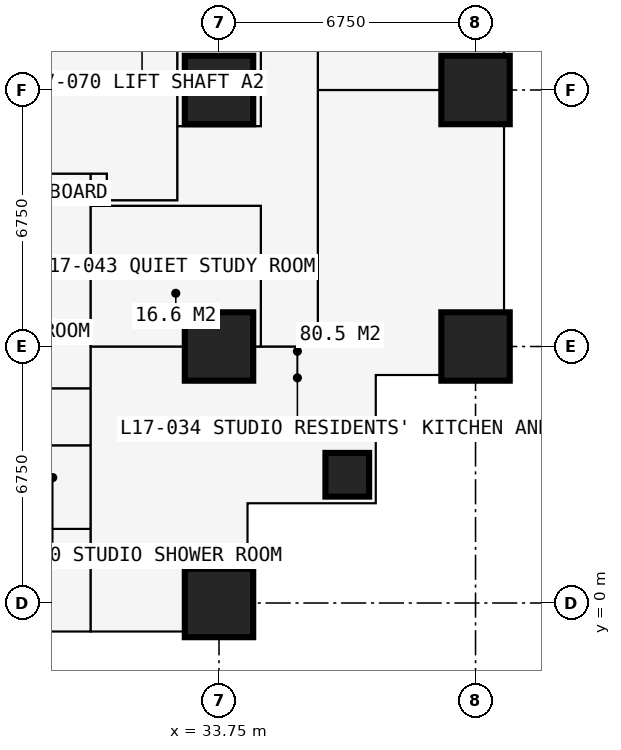
"""IFC4 building model, lengths in metres.
Left out: names, types, materials, properties, quantities, classifications, styles, units other than length and angle.
Written with IfcOpenShell. Run it as: python <this file> out.ifc"""

import sys

from ifc_helpers import new_model, si_unit, direction, frame, frame_2d, origin, origin_2d, place, context, subcontext, project, spatial, rectangle, extrude, element, fill, save


model = new_model("IFC4")
c1 = context("Model", 3, precision=1e-05, world=origin(), true_north=direction((0.0, 1.0)))
c2 = subcontext(c1, "Body", "Model", "MODEL_VIEW")
j1 = project(units=[si_unit("LENGTHUNIT", "METRE"), si_unit("PLANEANGLEUNIT", "RADIAN")], contexts=[c1])
p1 = place(None, origin())
s1 = spatial("IfcSite", under=j1, at=p1, CompositionType="ELEMENT")
p2 = place(p1, origin())
s2 = spatial("IfcBuilding", under=s1, at=p2, CompositionType="ELEMENT")
p3 = place(p2, frame((0.0, 0.0, 64.8)))
s3 = spatial("IfcBuildingStorey", under=s2, at=p3, CompositionType="ELEMENT", Elevation=64.8)
for number, where, z_axis, x_axis in (
    (1, (33.75, 0.0, 0.0), (0.0, 0.0, 1.0), (1.0, 0.0, 0.0)),
    (2, (33.75, 6.75, 0.0), (0.0, 0.0, 1.0), (1.0, 0.0, 0.0)),
    (3, (33.75, 13.5, 0.0), (0.0, 0.0, 1.0), (1.0, 0.0, 0.0)),
):
    element("IfcColumn", number, at=place(p3, frame(where, z_axis=z_axis, x_axis=x_axis)), inside=s3, PredefinedType="COLUMN", context=c2, shape_type="SweptSolid", body=[
        extrude(rectangle(XDim=1.8, YDim=1.8, at=origin_2d()), origin(), (0.0, 0.0, 1.0), 3.6),
    ])
p4 = place(p3, frame((37.125, 3.375, 0.0), z_axis=(0.0, 0.0, 1.0), x_axis=(1.0, 0.0, 0.0)))
e4 = element("IfcColumn", 4, at=p4, inside=s3, PredefinedType="COLUMN", context=c2, shape_type="SweptSolid", body=[
    extrude(rectangle(XDim=1.15, YDim=1.15, at=origin_2d()), origin(), (0.0, 0.0, 1.0), 3.6),
])
for number, where, z_axis, x_axis in (
    (5, (40.5, 6.75, 0.0), (0.0, 0.0, 1.0), (1.0, 0.0, 0.0)),
    (6, (40.5, 13.5, 0.0), (0.0, 0.0, 1.0), (1.0, 0.0, 0.0)),
):
    element("IfcColumn", number, at=place(p3, frame(where, z_axis=z_axis, x_axis=x_axis)), inside=s3, PredefinedType="COLUMN", context=c2, shape_type="SweptSolid", body=[
        extrude(rectangle(XDim=1.8, YDim=1.8, at=origin_2d()), origin(), (0.0, 0.0, 1.0), 3.6),
    ])
p5 = place(p3, frame((34.5, -0.75, 0.0), z_axis=(0.0, 0.0, 1.0), x_axis=(0.0, 1.0, 0.0)))
e7 = element("IfcWall", 7, at=p5, inside=s3, PredefinedType="SOLIDWALL", context=c2, shape_type="SweptSolid", body=[
    extrude(rectangle(XDim=3.375, YDim=0.3, at=frame_2d((1.688, 0.0))), origin(), (0.0, 0.0, 1.0), 3.375),
])
p6 = place(p5, frame((1.833, 0.0, 0.9)))
e8 = element("IfcOpeningElement", 8, at=p6, cuts=e7, PredefinedType="OPENING", context=c2, shape_type="SweptSolid", body=[
    extrude(rectangle(XDim=1.2, YDim=1.8, at=frame_2d((0.6, 0.9))), frame((0.0, 0.16, 0.0), z_axis=(0.0, -1.0, 0.0), x_axis=(1.0, 0.0, 0.0)), (0.0, 0.0, 1.0), 0.32),
])
p7 = place(p3, frame((34.5, 2.625, 0.0), z_axis=(0.0, 0.0, 1.0), x_axis=(1.0, 0.0, 0.0)))
e9 = element("IfcWall", 9, at=p7, inside=s3, PredefinedType="SOLIDWALL", context=c2, shape_type="SweptSolid", body=[
    extrude(rectangle(XDim=3.375, YDim=0.3, at=frame_2d((1.688, 0.0))), origin(), (0.0, 0.0, 1.0), 3.375),
])
p8 = place(p7, frame((0.788, 0.0, 0.6)))
e10 = element("IfcOpeningElement", 10, at=p8, cuts=e9, PredefinedType="OPENING", context=c2, shape_type="SweptSolid", body=[
    extrude(rectangle(XDim=1.8, YDim=2.1, at=frame_2d((0.9, 1.05))), frame((0.0, 0.16, 0.0), z_axis=(0.0, -1.0, 0.0), x_axis=(1.0, 0.0, 0.0)), (0.0, 0.0, 1.0), 0.32),
])
p9 = place(p3, frame((37.875, 2.625, 0.0), z_axis=(0.0, 0.0, 1.0), x_axis=(0.0, 1.0, 0.0)))
e11 = element("IfcWall", 11, at=p9, inside=s3, PredefinedType="SOLIDWALL", context=c2, shape_type="SweptSolid", body=[
    extrude(rectangle(XDim=3.375, YDim=0.3, at=frame_2d((1.688, 0.0))), origin(), (0.0, 0.0, 1.0), 3.375),
])
p10 = place(p9, frame((0.788, 0.0, 0.6)))
e12 = element("IfcOpeningElement", 12, at=p10, cuts=e11, PredefinedType="OPENING", context=c2, shape_type="SweptSolid", body=[
    extrude(rectangle(XDim=1.8, YDim=2.1, at=frame_2d((0.9, 1.05))), frame((0.0, 0.16, 0.0), z_axis=(0.0, -1.0, 0.0), x_axis=(1.0, 0.0, 0.0)), (0.0, 0.0, 1.0), 0.32),
])
p11 = place(p3, frame((37.875, 6.0, 0.0), z_axis=(0.0, 0.0, 1.0), x_axis=(1.0, 0.0, 0.0)))
e13 = element("IfcWall", 13, at=p11, inside=s3, PredefinedType="SOLIDWALL", context=c2, shape_type="SweptSolid", body=[
    extrude(rectangle(XDim=3.375, YDim=0.3, at=frame_2d((1.688, 0.0))), origin(), (0.0, 0.0, 1.0), 3.375),
])
p12 = place(p11, frame((0.343, 0.0, 0.9)))
e14 = element("IfcOpeningElement", 14, at=p12, cuts=e13, PredefinedType="OPENING", context=c2, shape_type="SweptSolid", body=[
    extrude(rectangle(XDim=1.2, YDim=1.8, at=frame_2d((0.6, 0.9))), frame((0.0, 0.16, 0.0), z_axis=(0.0, -1.0, 0.0), x_axis=(1.0, 0.0, 0.0)), (0.0, 0.0, 1.0), 0.32),
])
p13 = place(p3, frame((6.75, 4.15, 0.0), z_axis=(0.0, 0.0, 1.0), x_axis=(1.0, 0.0, 0.0)))
e15 = element("IfcWall", 15, at=p13, inside=s3, PredefinedType="PARTITIONING", context=c2, shape_type="SweptSolid", body=[
    extrude(rectangle(XDim=23.625, YDim=0.1, at=frame_2d((11.812, 0.0))), origin(), (0.0, 0.0, 1.0), 3.375),
])
p14 = place(p13, frame((1.2, 0.0, 0.0)))
e16 = element("IfcOpeningElement", 16, at=p14, cuts=e15, PredefinedType="OPENING", context=c2, shape_type="SweptSolid", body=[
    extrude(rectangle(XDim=1.0, YDim=2.2, at=frame_2d((0.5, 1.1))), frame((0.0, 0.06, 0.0), z_axis=(0.0, -1.0, 0.0), x_axis=(1.0, 0.0, 0.0)), (0.0, 0.0, 1.0), 0.12),
])
p15 = place(p13, frame((3.575, 0.0, 0.0)))
e17 = element("IfcOpeningElement", 17, at=p15, cuts=e15, PredefinedType="OPENING", context=c2, shape_type="SweptSolid", body=[
    extrude(rectangle(XDim=0.95, YDim=2.2, at=frame_2d((0.475, 1.1))), frame((0.0, 0.06, 0.0), z_axis=(0.0, -1.0, 0.0), x_axis=(1.0, 0.0, 0.0)), (0.0, 0.0, 1.0), 0.12),
])
p16 = place(p13, frame((7.0, 0.0, 0.0)))
e18 = element("IfcOpeningElement", 18, at=p16, cuts=e15, PredefinedType="OPENING", context=c2, shape_type="SweptSolid", body=[
    extrude(rectangle(XDim=0.95, YDim=2.2, at=frame_2d((0.475, 1.1))), frame((0.0, 0.06, 0.0), z_axis=(0.0, -1.0, 0.0), x_axis=(1.0, 0.0, 0.0)), (0.0, 0.0, 1.0), 0.12),
])
p17 = place(p13, frame((10.375, 0.0, 0.0)))
e19 = element("IfcOpeningElement", 19, at=p17, cuts=e15, PredefinedType="OPENING", context=c2, shape_type="SweptSolid", body=[
    extrude(rectangle(XDim=0.95, YDim=2.2, at=frame_2d((0.475, 1.1))), frame((0.0, 0.06, 0.0), z_axis=(0.0, -1.0, 0.0), x_axis=(1.0, 0.0, 0.0)), (0.0, 0.0, 1.0), 0.12),
])
p18 = place(p13, frame((13.7, 0.0, 0.0)))
e20 = element("IfcOpeningElement", 20, at=p18, cuts=e15, PredefinedType="OPENING", context=c2, shape_type="SweptSolid", body=[
    extrude(rectangle(XDim=0.95, YDim=2.2, at=frame_2d((0.475, 1.1))), frame((0.0, 0.06, 0.0), z_axis=(0.0, -1.0, 0.0), x_axis=(1.0, 0.0, 0.0)), (0.0, 0.0, 1.0), 0.12),
])
p19 = place(p13, frame((17.125, 0.0, 0.0)))
e21 = element("IfcOpeningElement", 21, at=p19, cuts=e15, PredefinedType="OPENING", context=c2, shape_type="SweptSolid", body=[
    extrude(rectangle(XDim=0.95, YDim=2.2, at=frame_2d((0.475, 1.1))), frame((0.0, 0.06, 0.0), z_axis=(0.0, -1.0, 0.0), x_axis=(1.0, 0.0, 0.0)), (0.0, 0.0, 1.0), 0.12),
])
p20 = place(p13, frame((20.5, 0.0, 0.0)))
e22 = element("IfcOpeningElement", 22, at=p20, cuts=e15, PredefinedType="OPENING", context=c2, shape_type="SweptSolid", body=[
    extrude(rectangle(XDim=0.95, YDim=2.2, at=frame_2d((0.475, 1.1))), frame((0.0, 0.06, 0.0), z_axis=(0.0, -1.0, 0.0), x_axis=(1.0, 0.0, 0.0)), (0.0, 0.0, 1.0), 0.12),
])
p21 = place(p3, frame((10.125, 11.3, 0.0), z_axis=(0.0, 0.0, 1.0), x_axis=(1.0, 0.0, 0.0)))
e23 = element("IfcWall", 23, at=p21, inside=s3, PredefinedType="PARTITIONING", context=c2, shape_type="SweptSolid", body=[
    extrude(rectangle(XDim=20.675, YDim=0.15, at=frame_2d((10.337, 0.0))), origin(), (0.0, 0.0, 1.0), 3.375),
])
p22 = place(p21, frame((8.375, 0.0, 0.0)))
e24 = element("IfcOpeningElement", 24, at=p22, cuts=e23, PredefinedType="OPENING", context=c2, shape_type="SweptSolid", body=[
    extrude(rectangle(XDim=1.0, YDim=2.2, at=frame_2d((0.5, 1.1))), frame((0.0, 0.085, 0.0), z_axis=(0.0, -1.0, 0.0), x_axis=(1.0, 0.0, 0.0)), (0.0, 0.0, 1.0), 0.17),
])
p23 = place(p21, frame((10.975, 0.0, 0.0)))
e25 = element("IfcOpeningElement", 25, at=p23, cuts=e23, PredefinedType="OPENING", context=c2, shape_type="SweptSolid", body=[
    extrude(rectangle(XDim=1.0, YDim=2.2, at=frame_2d((0.5, 1.1))), frame((0.0, 0.085, 0.0), z_axis=(0.0, -1.0, 0.0), x_axis=(1.0, 0.0, 0.0)), (0.0, 0.0, 1.0), 0.17),
])
p24 = place(p21, frame((3.925, 0.0, 0.0)))
e26 = element("IfcOpeningElement", 26, at=p24, cuts=e23, PredefinedType="OPENING", context=c2, shape_type="SweptSolid", body=[
    extrude(rectangle(XDim=0.95, YDim=2.2, at=frame_2d((0.475, 1.1))), frame((0.0, 0.085, 0.0), z_axis=(0.0, -1.0, 0.0), x_axis=(1.0, 0.0, 0.0)), (0.0, 0.0, 1.0), 0.17),
])
p25 = place(p3, frame((22.988, 5.65, 0.0), z_axis=(0.0, 0.0, 1.0), x_axis=(1.0, 0.0, 0.0)))
e27 = element("IfcWall", 27, at=p25, inside=s3, PredefinedType="PARTITIONING", context=c2, shape_type="SweptSolid", body=[
    extrude(rectangle(XDim=7.387, YDim=0.15, at=frame_2d((3.694, 0.0))), origin(), (0.0, 0.0, 1.0), 3.375),
])
p26 = place(p25, frame((2.15, 0.0, 0.0)))
e28 = element("IfcOpeningElement", 28, at=p26, cuts=e27, PredefinedType="OPENING", context=c2, shape_type="SweptSolid", body=[
    extrude(rectangle(XDim=0.95, YDim=2.2, at=frame_2d((0.475, 1.1))), frame((0.0, 0.085, 0.0), z_axis=(0.0, -1.0, 0.0), x_axis=(1.0, 0.0, 0.0)), (0.0, 0.0, 1.0), 0.17),
])
p27 = place(p3, frame((28.375, 1.95, 0.0), z_axis=(0.0, 0.0, 1.0), x_axis=(1.0, 0.0, 0.0)))
e29 = element("IfcWall", 29, at=p27, inside=s3, PredefinedType="PARTITIONING", context=c2, shape_type="SweptSolid", body=[
    extrude(rectangle(XDim=2.0, YDim=0.1, at=frame_2d((1.0, 0.0))), origin(), (0.0, 0.0, 1.0), 3.375),
])
p28 = place(p3, frame((30.375, -0.734, 0.0), z_axis=(0.0, 0.0, 1.0), x_axis=(0.0, 1.0, 0.0)))
e30 = element("IfcWall", 30, at=p28, inside=s3, PredefinedType="PARTITIONING", context=c2, shape_type="SweptSolid", body=[
    extrude(rectangle(XDim=12.034, YDim=0.15, at=frame_2d((6.017, 0.0))), origin(), (0.0, 0.0, 1.0), 3.375),
])
p29 = place(p28, frame((5.134, 0.0, 0.0)))
e31 = element("IfcOpeningElement", 31, at=p29, cuts=e30, PredefinedType="OPENING", context=c2, shape_type="SweptSolid", body=[
    extrude(rectangle(XDim=1.0, YDim=2.2, at=frame_2d((0.5, 1.1))), frame((0.0, 0.085, 0.0), z_axis=(0.0, -1.0, 0.0), x_axis=(1.0, 0.0, 0.0)), (0.0, 0.0, 1.0), 0.17),
])
p30 = place(p3, frame((30.375, 6.75, 0.0), z_axis=(0.0, 0.0, 1.0), x_axis=(1.0, 0.0, 0.0)))
e32 = element("IfcWall", 32, at=p30, inside=s3, PredefinedType="PARTITIONING", context=c2, shape_type="SweptSolid", body=[
    extrude(rectangle(XDim=5.975, YDim=0.15, at=frame_2d((2.988, 0.0))), origin(), (0.0, 0.0, 1.0), 2.877),
])
p31 = place(p3, frame((30.375, 10.45, 0.0), z_axis=(0.0, 0.0, 1.0), x_axis=(1.0, 0.0, 0.0)))
e33 = element("IfcWall", 33, at=p31, inside=s3, PredefinedType="PARTITIONING", context=c2, shape_type="SweptSolid", body=[
    extrude(rectangle(XDim=4.475, YDim=0.15, at=frame_2d((2.238, 0.0))), origin(), (0.0, 0.0, 1.0), 3.375),
])
p32 = place(p31, frame((2.35, 0.0, 0.0)))
e34 = element("IfcOpeningElement", 34, at=p32, cuts=e33, PredefinedType="OPENING", context=c2, shape_type="SweptSolid", body=[
    extrude(rectangle(XDim=0.95, YDim=2.2, at=frame_2d((0.475, 1.1))), frame((0.0, 0.085, 0.0), z_axis=(0.0, -1.0, 0.0), x_axis=(1.0, 0.0, 0.0)), (0.0, 0.0, 1.0), 0.17),
])
p33 = place(p3, frame((30.8, 10.6, 0.0), z_axis=(0.0, 0.0, 1.0), x_axis=(0.0, 1.0, 0.0)))
e35 = element("IfcWall", 35, at=p33, inside=s3, PredefinedType="PARTITIONING", context=c2, shape_type="SweptSolid", body=[
    extrude(rectangle(XDim=0.7, YDim=0.15, at=frame_2d((0.35, 0.0))), origin(), (0.0, 0.0, 1.0), 3.375),
])
p34 = place(p3, frame((30.8, 10.6, 0.0), z_axis=(0.0, 0.0, 1.0), x_axis=(1.0, 0.0, 0.0)))
e36 = element("IfcWall", 36, at=p34, inside=s3, PredefinedType="PARTITIONING", context=c2, shape_type="SweptSolid", body=[
    extrude(rectangle(XDim=1.85, YDim=0.15, at=frame_2d((0.925, 0.0))), origin(), (0.0, 0.0, 1.0), 3.375),
])
p35 = place(p3, frame((32.65, 10.6, 0.0), z_axis=(0.0, 0.0, 1.0), x_axis=(0.0, 1.0, 0.0)))
e37 = element("IfcWall", 37, at=p35, inside=s3, PredefinedType="SHEAR", context=c2, shape_type="SweptSolid", body=[
    extrude(rectangle(XDim=9.3, YDim=0.1, at=frame_2d((4.65, 0.0))), origin(), (0.0, 0.0, 1.0), 3.375),
])
p36 = place(p35, frame((0.5, 0.0, 0.0)))
e38 = element("IfcOpeningElement", 38, at=p36, cuts=e37, PredefinedType="OPENING", context=c2, shape_type="SweptSolid", body=[
    extrude(rectangle(XDim=1.0, YDim=2.2, at=frame_2d((0.5, 1.1))), frame((0.0, 0.06, 0.0), z_axis=(0.0, -1.0, 0.0), x_axis=(1.0, 0.0, 0.0)), (0.0, 0.0, 1.0), 0.12),
])
p37 = place(p3, frame((32.65, 12.55, 0.0), z_axis=(0.0, 0.0, 1.0), x_axis=(1.0, 0.0, 0.0)))
e39 = element("IfcWall", 39, at=p37, inside=s3, PredefinedType="PARTITIONING", context=c2, shape_type="SweptSolid", body=[
    extrude(rectangle(XDim=2.2, YDim=0.15, at=frame_2d((1.1, 0.0))), origin(), (0.0, 0.0, 1.0), 3.375),
])
p38 = place(p3, frame((34.85, 6.75, 0.0), z_axis=(0.0, 0.0, 1.0), x_axis=(0.0, 1.0, 0.0)))
e40 = element("IfcWall", 40, at=p38, inside=s3, PredefinedType="PARTITIONING", context=c2, shape_type="SweptSolid", body=[
    extrude(rectangle(XDim=3.7, YDim=0.15, at=frame_2d((1.85, 0.0))), origin(), (0.0, 0.0, 1.0), 3.375),
])
p39 = place(p3, frame((34.85, 12.55, 0.0), z_axis=(0.0, 0.0, 1.0), x_axis=(0.0, 1.0, 0.0)))
e41 = element("IfcWall", 41, at=p39, inside=s3, PredefinedType="PARTITIONING", context=c2, shape_type="SweptSolid", body=[
    extrude(rectangle(XDim=17.825, YDim=0.15, at=frame_2d((8.913, 0.0))), origin(), (0.0, 0.0, 1.0), 3.375),
])
p40 = place(p39, frame((8.6, 0.0, 0.0)))
e42 = element("IfcOpeningElement", 42, at=p40, cuts=e41, PredefinedType="OPENING", context=c2, shape_type="SweptSolid", body=[
    extrude(rectangle(XDim=0.95, YDim=2.2, at=frame_2d((0.475, 1.1))), frame((0.0, 0.085, 0.0), z_axis=(0.0, -1.0, 0.0), x_axis=(1.0, 0.0, 0.0)), (0.0, 0.0, 1.0), 0.17),
])
p41 = place(p3, frame((36.35, 6.75, 0.0), z_axis=(0.0, 0.0, 1.0), x_axis=(0.0, 1.0, 0.0)))
e43 = element("IfcWall", 43, at=p41, inside=s3, PredefinedType="PARTITIONING", context=c2, shape_type="SweptSolid", body=[
    extrude(rectangle(XDim=23.625, YDim=0.15, at=frame_2d((11.812, 0.0))), origin(), (0.0, 0.0, 1.0), 3.375),
])
p42 = place(p41, frame((18.475, 0.0, 0.0)))
e44 = element("IfcOpeningElement", 44, at=p42, cuts=e43, PredefinedType="OPENING", context=c2, shape_type="SweptSolid", body=[
    extrude(rectangle(XDim=0.95, YDim=2.2, at=frame_2d((0.475, 1.1))), frame((0.0, 0.085, 0.0), z_axis=(0.0, -1.0, 0.0), x_axis=(1.0, 0.0, 0.0)), (0.0, 0.0, 1.0), 0.17),
])
p43 = place(p41, frame((11.725, 0.0, 0.0)))
e45 = element("IfcOpeningElement", 45, at=p43, cuts=e43, PredefinedType="OPENING", context=c2, shape_type="SweptSolid", body=[
    extrude(rectangle(XDim=0.95, YDim=2.2, at=frame_2d((0.475, 1.1))), frame((0.0, 0.085, 0.0), z_axis=(0.0, -1.0, 0.0), x_axis=(1.0, 0.0, 0.0)), (0.0, 0.0, 1.0), 0.17),
])
p44 = place(p41, frame((6.95, 0.0, 0.0)))
e46 = element("IfcOpeningElement", 46, at=p44, cuts=e43, PredefinedType="OPENING", context=c2, shape_type="SweptSolid", body=[
    extrude(rectangle(XDim=0.95, YDim=2.2, at=frame_2d((0.475, 1.1))), frame((0.0, 0.085, 0.0), z_axis=(0.0, -1.0, 0.0), x_axis=(1.0, 0.0, 0.0)), (0.0, 0.0, 1.0), 0.17),
])
p45 = place(p3, frame((36.35, 13.5, 0.0), z_axis=(0.0, 0.0, 1.0), x_axis=(1.0, 0.0, 0.0)))
e47 = element("IfcWall", 47, at=p45, inside=s3, PredefinedType="PARTITIONING", context=c2, shape_type="SweptSolid", body=[
    extrude(rectangle(XDim=4.884, YDim=0.15, at=frame_2d((2.442, 0.0))), origin(), (0.0, 0.0, 1.0), 2.61),
])
p46 = place(p6, origin())
e48 = element("IfcWindow", 48, at=p46, inside=s3, PartitioningType="SINGLE_PANEL", PredefinedType="WINDOW", context=c2, shape_type="SweptSolid", body=[
    extrude(rectangle(XDim=1.2, YDim=1.8, at=frame_2d((0.6, 0.9))), frame((0.0, 0.03, 0.0), z_axis=(0.0, -1.0, 0.0), x_axis=(1.0, 0.0, 0.0)), (0.0, 0.0, 1.0), 0.06),
])
fill(e8, e48)
p47 = place(p8, origin())
e49 = element("IfcWindow", 49, at=p47, inside=s3, PartitioningType="SINGLE_PANEL", PredefinedType="WINDOW", context=c2, shape_type="SweptSolid", body=[
    extrude(rectangle(XDim=1.8, YDim=2.1, at=frame_2d((0.9, 1.05))), frame((0.0, 0.03, 0.0), z_axis=(0.0, -1.0, 0.0), x_axis=(1.0, 0.0, 0.0)), (0.0, 0.0, 1.0), 0.06),
])
fill(e10, e49)
p48 = place(p10, origin())
e50 = element("IfcWindow", 50, at=p48, inside=s3, PartitioningType="SINGLE_PANEL", PredefinedType="WINDOW", context=c2, shape_type="SweptSolid", body=[
    extrude(rectangle(XDim=1.8, YDim=2.1, at=frame_2d((0.9, 1.05))), frame((0.0, 0.03, 0.0), z_axis=(0.0, -1.0, 0.0), x_axis=(1.0, 0.0, 0.0)), (0.0, 0.0, 1.0), 0.06),
])
fill(e12, e50)
p49 = place(p12, origin())
e51 = element("IfcWindow", 51, at=p49, inside=s3, PartitioningType="SINGLE_PANEL", PredefinedType="WINDOW", context=c2, shape_type="SweptSolid", body=[
    extrude(rectangle(XDim=1.2, YDim=1.8, at=frame_2d((0.6, 0.9))), frame((0.0, 0.03, 0.0), z_axis=(0.0, -1.0, 0.0), x_axis=(1.0, 0.0, 0.0)), (0.0, 0.0, 1.0), 0.06),
])
fill(e14, e51)
p50 = place(p29, origin())
e52 = element("IfcDoor", 52, at=p50, inside=s3, OperationType="SINGLE_SWING_LEFT", PredefinedType="DOOR", context=c2, shape_type="SweptSolid", body=[
    extrude(rectangle(XDim=1.0, YDim=2.2, at=frame_2d((0.5, 1.1))), frame((0.0, 0.025, 0.0), z_axis=(0.0, -1.0, 0.0), x_axis=(1.0, 0.0, 0.0)), (0.0, 0.0, 1.0), 0.05),
])
fill(e31, e52)
p51 = place(p44, origin())
e53 = element("IfcDoor", 53, at=p51, inside=s3, OperationType="SINGLE_SWING_LEFT", PredefinedType="DOOR", context=c2, shape_type="SweptSolid", body=[
    extrude(rectangle(XDim=0.95, YDim=2.2, at=frame_2d((0.475, 1.1))), frame((0.0, 0.025, 0.0), z_axis=(0.0, -1.0, 0.0), x_axis=(1.0, 0.0, 0.0)), (0.0, 0.0, 1.0), 0.05),
])
fill(e46, e53)
p52 = place(p36, origin())
e54 = element("IfcDoor", 54, at=p52, inside=s3, OperationType="SINGLE_SWING_LEFT", PredefinedType="DOOR", context=c2, shape_type="SweptSolid", body=[
    extrude(rectangle(XDim=1.0, YDim=2.2, at=frame_2d((0.5, 1.1))), frame((0.0, 0.025, 0.0), z_axis=(0.0, -1.0, 0.0), x_axis=(1.0, 0.0, 0.0)), (0.0, 0.0, 1.0), 0.05),
])
fill(e38, e54)
p53 = place(p32, origin())
e55 = element("IfcDoor", 55, at=p53, inside=s3, OperationType="SINGLE_SWING_LEFT", PredefinedType="DOOR", context=c2, shape_type="SweptSolid", body=[
    extrude(rectangle(XDim=0.95, YDim=2.2, at=frame_2d((0.475, 1.1))), frame((0.0, 0.025, 0.0), z_axis=(0.0, -1.0, 0.0), x_axis=(1.0, 0.0, 0.0)), (0.0, 0.0, 1.0), 0.05),
])
fill(e34, e55)
save(model, sys.argv[1])
